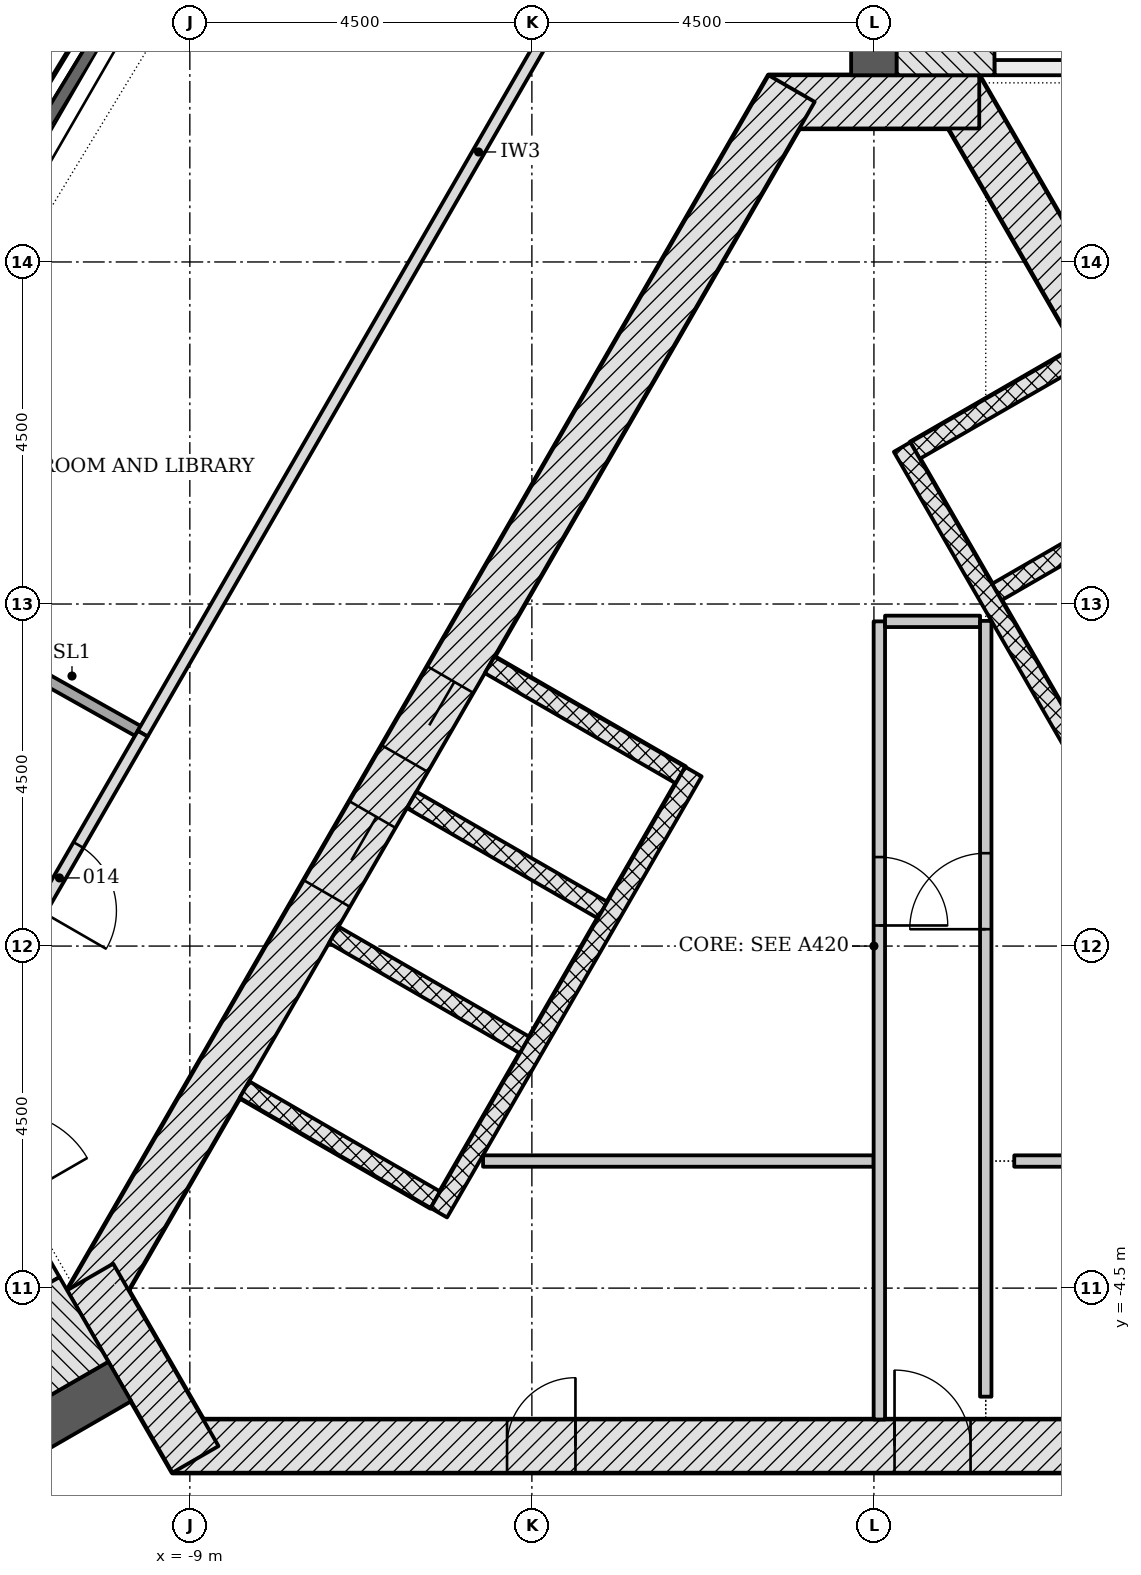
"""IFC4 building model, lengths in metres.
Left out: names, types, materials, properties, quantities, classifications, styles, units other than length and angle.
Written with IfcOpenShell. Run it as: python <this file> out.ifc"""

import sys

from ifc_helpers import new_model, si_unit, direction, frame, frame_2d, origin, place, context, subcontext, project, spatial, rectangle, extrude, element, fill, save


model = new_model("IFC4")
c1 = context("Model", 3, precision=1e-05, world=origin(), true_north=direction((0.0, 1.0)))
c2 = subcontext(c1, "Body", "Model", "MODEL_VIEW")
j1 = project(units=[si_unit("LENGTHUNIT", "METRE"), si_unit("PLANEANGLEUNIT", "RADIAN")], contexts=[c1])
p1 = place(None, origin())
s1 = spatial("IfcSite", under=j1, at=p1, CompositionType="ELEMENT")
p2 = place(p1, origin())
s2 = spatial("IfcBuilding", under=s1, at=p2, CompositionType="ELEMENT")
p3 = place(p2, frame((0.0, 0.0, 240.0)))
s3 = spatial("IfcBuildingStorey", under=s2, at=p3, CompositionType="ELEMENT", Elevation=240.0)
p4 = place(p3, frame((-9.229, -6.578, -0.2), z_axis=(0.0, 0.0, 1.0), x_axis=(1.0, 0.0, 0.0)))
e1 = element("IfcWall", 1, at=p4, inside=s3, PredefinedType="SHEAR", context=c2, shape_type="SweptSolid", body=[
    extrude(rectangle(XDim=18.458, YDim=0.7, at=frame_2d((9.229, 0.0))), origin(), (0.0, 0.0, 1.0), 3.6),
])
p5 = place(p4, frame((9.5, 0.0, 0.2)))
e2 = element("IfcOpeningElement", 2, at=p5, cuts=e1, PredefinedType="OPENING", context=c2, shape_type="SweptSolid", body=[
    extrude(rectangle(XDim=1.0, YDim=2.1, at=frame_2d((0.5, 1.05))), frame((0.0, 0.36, 0.0), z_axis=(0.0, -1.0, 0.0), x_axis=(1.0, 0.0, 0.0)), (0.0, 0.0, 1.0), 0.72),
])
p6 = place(p4, frame((4.402, 0.0, 0.2)))
e3 = element("IfcOpeningElement", 3, at=p6, cuts=e1, PredefinedType="OPENING", context=c2, shape_type="SweptSolid", body=[
    extrude(rectangle(XDim=0.9, YDim=2.1, at=frame_2d((0.45, 1.05))), frame((0.0, 0.36, 0.0), z_axis=(0.0, -1.0, 0.0), x_axis=(1.0, 0.0, 0.0)), (0.0, 0.0, 1.0), 0.72),
])
p7 = place(p4, frame((13.927, 0.0, 0.2)))
e4 = element("IfcOpeningElement", 4, at=p7, cuts=e1, PredefinedType="OPENING", context=c2, shape_type="SweptSolid", body=[
    extrude(rectangle(XDim=0.9, YDim=2.1, at=frame_2d((0.45, 1.05))), frame((0.0, 0.36, 0.0), z_axis=(0.0, -1.0, 0.0), x_axis=(1.0, 0.0, 0.0)), (0.0, 0.0, 1.0), 0.72),
])
p8 = place(p3, frame((10.311, -4.703, -0.2), z_axis=(0.0, 0.0, 1.0), x_axis=(-0.500001446645, 0.866024568562, 0.0)))
e5 = element("IfcWall", 5, at=p8, inside=s3, PredefinedType="SHEAR", context=c2, shape_type="SweptSolid", body=[
    extrude(rectangle(XDim=18.458, YDim=0.7, at=frame_2d((9.229, 0.0))), origin(), (0.0, 0.0, 1.0), 3.6),
])
p9 = place(p8, frame((4.379, 0.0, 0.2)))
e6 = element("IfcOpeningElement", 6, at=p9, cuts=e5, PredefinedType="OPENING", context=c2, shape_type="SweptSolid", body=[
    extrude(rectangle(XDim=1.1, YDim=2.1, at=frame_2d((0.55, 1.05))), frame((0.0, 0.36, 0.0), z_axis=(0.0, -1.0, 0.0), x_axis=(1.0, 0.0, 0.0)), (0.0, 0.0, 1.0), 0.72),
])
p10 = place(p8, frame((6.529, 0.0, 0.2)))
e7 = element("IfcOpeningElement", 7, at=p10, cuts=e5, PredefinedType="OPENING", context=c2, shape_type="SweptSolid", body=[
    extrude(rectangle(XDim=1.1, YDim=2.1, at=frame_2d((0.55, 1.05))), frame((0.0, 0.36, 0.0), z_axis=(0.0, -1.0, 0.0), x_axis=(1.0, 0.0, 0.0)), (0.0, 0.0, 1.0), 0.72),
])
p11 = place(p8, frame((8.679, 0.0, 0.2)))
e8 = element("IfcOpeningElement", 8, at=p11, cuts=e5, PredefinedType="OPENING", context=c2, shape_type="SweptSolid", body=[
    extrude(rectangle(XDim=1.1, YDim=2.1, at=frame_2d((0.55, 1.05))), frame((0.0, 0.36, 0.0), z_axis=(0.0, -1.0, 0.0), x_axis=(1.0, 0.0, 0.0)), (0.0, 0.0, 1.0), 0.72),
])
p12 = place(p8, frame((10.829, 0.0, 0.2)))
e9 = element("IfcOpeningElement", 9, at=p12, cuts=e5, PredefinedType="OPENING", context=c2, shape_type="SweptSolid", body=[
    extrude(rectangle(XDim=1.1, YDim=2.1, at=frame_2d((0.55, 1.05))), frame((0.0, 0.36, 0.0), z_axis=(0.0, -1.0, 0.0), x_axis=(1.0, 0.0, 0.0)), (0.0, 0.0, 1.0), 0.72),
])
p13 = place(p8, frame((12.979, 0.0, 0.2)))
e10 = element("IfcOpeningElement", 10, at=p13, cuts=e5, PredefinedType="OPENING", context=c2, shape_type="SweptSolid", body=[
    extrude(rectangle(XDim=1.1, YDim=2.1, at=frame_2d((0.55, 1.05))), frame((0.0, 0.36, 0.0), z_axis=(0.0, -1.0, 0.0), x_axis=(1.0, 0.0, 0.0)), (0.0, 0.0, 1.0), 0.72),
])
p14 = place(p3, frame((1.386, 11.106, -0.2), z_axis=(0.0, 0.0, 1.0), x_axis=(-1.0, 0.0, 0.0)))
e11 = element("IfcWall", 11, at=p14, inside=s3, PredefinedType="SHEAR", context=c2, shape_type="SweptSolid", body=[
    extrude(rectangle(XDim=2.771, YDim=0.7, at=frame_2d((1.386, 0.0))), origin(), (0.0, 0.0, 1.0), 3.6),
])
p15 = place(p3, frame((-1.083, 11.281, -0.2), z_axis=(0.0, 0.0, 1.0), x_axis=(-0.500001446645, -0.866024568562, 0.0)))
e12 = element("IfcWall", 12, at=p15, inside=s3, PredefinedType="SHEAR", context=c2, shape_type="SweptSolid", body=[
    extrude(rectangle(XDim=18.458, YDim=0.7, at=frame_2d((9.229, 0.0))), origin(), (0.0, 0.0, 1.0), 3.6),
])
p16 = place(p15, frame((8.979, 0.0, 0.2)))
e13 = element("IfcOpeningElement", 13, at=p16, cuts=e12, PredefinedType="OPENING", context=c2, shape_type="SweptSolid", body=[
    extrude(rectangle(XDim=1.2, YDim=2.1, at=frame_2d((0.6, 1.05))), frame((0.0, 0.36, 0.0), z_axis=(0.0, -1.0, 0.0), x_axis=(1.0, 0.0, 0.0)), (0.0, 0.0, 1.0), 0.72),
])
p17 = place(p15, frame((11.029, 0.0, 0.2)))
e14 = element("IfcOpeningElement", 14, at=p17, cuts=e12, PredefinedType="OPENING", context=c2, shape_type="SweptSolid", body=[
    extrude(rectangle(XDim=1.2, YDim=2.1, at=frame_2d((0.6, 1.05))), frame((0.0, 0.36, 0.0), z_axis=(0.0, -1.0, 0.0), x_axis=(1.0, 0.0, 0.0)), (0.0, 0.0, 1.0), 0.72),
])
p18 = place(p3, frame((-10.311, -4.353, -0.2), z_axis=(0.0, 0.0, 1.0), x_axis=(0.500042739161, -0.866000726912, 0.0)))
e15 = element("IfcWall", 15, at=p18, inside=s3, PredefinedType="SHEAR", context=c2, shape_type="SweptSolid", body=[
    extrude(rectangle(XDim=2.771, YDim=0.7, at=frame_2d((1.386, 0.0))), origin(), (0.0, 0.0, 1.0), 3.6),
])
p19 = place(p3, frame((0.0, 11.456, -0.2), z_axis=(0.0, 0.0, 1.0), x_axis=(0.0, 1.0, 0.0)))
e16 = element("IfcWall", 16, at=p19, inside=s3, PredefinedType="SHEAR", context=c2, shape_type="SweptSolid", body=[
    extrude(rectangle(XDim=7.094, YDim=0.6, at=frame_2d((3.547, 0.0))), origin(), (0.0, 0.0, 1.0), 3.6),
])
p20 = place(p3, frame((-9.922, -5.728, -0.2), z_axis=(0.0, 0.0, 1.0), x_axis=(-0.866029688112, -0.499992579254, 0.0)))
e17 = element("IfcWall", 17, at=p20, inside=s3, PredefinedType="SHEAR", context=c2, shape_type="SweptSolid", body=[
    extrude(rectangle(XDim=7.093, YDim=0.6, at=frame_2d((3.547, 0.0))), origin(), (0.0, 0.0, 1.0), 3.6),
])
for number, where, z_axis, x_axis in (
    (18, (3.781, 5.907, -0.2), (0.0, 0.0, 1.0), (-0.866, -0.5, 0.0)),
    (19, (2.706, 7.769, -0.2), (0.0, 0.0, 1.0), (-0.866, -0.5, 0.0)),
):
    element("IfcWall", number, at=place(p3, frame(where, z_axis=z_axis, x_axis=x_axis)), inside=s3, PredefinedType="PARTITIONING", context=c2, shape_type="SweptSolid", body=[
        extrude(rectangle(XDim=2.5, YDim=0.25, at=frame_2d((1.25, 0.0))), origin(), (0.0, 0.0, 1.0), 3.6),
    ])
p21 = place(p3, frame((5.87, -2.961, 0.0), z_axis=(0.0, 0.0, 1.0), x_axis=(-0.50000615651, 0.866021849293, 0.0)))
e20 = element("IfcWall", 20, at=p21, inside=s3, PredefinedType="PARTITIONING", context=c2, shape_type="SweptSolid", body=[
    extrude(rectangle(XDim=11.0, YDim=0.25, at=frame_2d((5.5, 0.0))), origin(), (0.0, 0.0, 1.0), 3.4),
])
for number, where, z_axis, x_axis in (
    (21, (-5.056, 3.699, -0.2), (0.0, 0.0, 1.0), (0.866, -0.5, 0.0)),
    (22, (-6.081, 1.923, -0.2), (0.0, 0.0, 1.0), (0.866, -0.5, 0.0)),
    (23, (-7.106, 0.148, -0.2), (0.0, 0.0, 1.0), (0.866, -0.5, 0.0)),
    (24, (-8.281, -1.887, -0.2), (0.0, 0.0, 1.0), (0.866, -0.5, 0.0)),
):
    element("IfcWall", number, at=place(p3, frame(where, z_axis=z_axis, x_axis=x_axis)), inside=s3, PredefinedType="PARTITIONING", context=c2, shape_type="SweptSolid", body=[
        extrude(rectangle(XDim=2.9, YDim=0.25, at=frame_2d((1.45, 0.0))), origin(), (0.0, 0.0, 1.0), 3.6),
    ])
p22 = place(p3, frame((-2.374, 2.294, 0.0), z_axis=(0.0, 0.0, 1.0), x_axis=(-0.500003174267, -0.866023571113, 0.0)))
e25 = element("IfcWall", 25, at=p22, inside=s3, PredefinedType="PARTITIONING", context=c2, shape_type="SweptSolid", body=[
    extrude(rectangle(XDim=6.7, YDim=0.25, at=frame_2d((3.35, 0.0))), origin(), (0.0, 0.0, 1.0), 3.4),
])
p23 = place(p3, frame((-5.142, -2.828, 0.0), z_axis=(0.0, 0.0, 1.0), x_axis=(1.0, 0.0, 0.0)))
e26 = element("IfcWall", 26, at=p23, inside=s3, PredefinedType="PARTITIONING", context=c2, shape_type="SweptSolid", body=[
    extrude(rectangle(XDim=5.139, YDim=0.15, at=frame_2d((2.569, 0.0))), origin(), (0.0, 0.0, 1.0), 3.4),
])
p24 = place(p3, frame((0.071, 4.272, 0.0), z_axis=(0.0, 0.0, 1.0), x_axis=(0.0, -1.0, 0.0)))
e27 = element("IfcWall", 27, at=p24, inside=s3, PredefinedType="PARTITIONING", context=c2, shape_type="SweptSolid", body=[
    extrude(rectangle(XDim=10.5, YDim=0.15, at=frame_2d((5.25, 0.0))), origin(), (0.0, 0.0, 1.0), 3.4),
])
p25 = place(p24, frame((3.101, 0.0, 0.0)))
e28 = element("IfcOpeningElement", 28, at=p25, cuts=e27, PredefinedType="OPENING", context=c2, shape_type="SweptSolid", body=[
    extrude(rectangle(XDim=0.9, YDim=2.1, at=frame_2d((0.45, 1.05))), frame((0.0, 0.085, 0.0), z_axis=(0.0, -1.0, 0.0), x_axis=(1.0, 0.0, 0.0)), (0.0, 0.0, 1.0), 0.17),
])
p26 = place(p3, frame((0.146, 4.272, 0.0), z_axis=(0.0, 0.0, 1.0), x_axis=(1.0, 0.0, 0.0)))
e29 = element("IfcWall", 29, at=p26, inside=s3, PredefinedType="PARTITIONING", context=c2, shape_type="SweptSolid", body=[
    extrude(rectangle(XDim=1.25, YDim=0.15, at=frame_2d((0.625, 0.0))), origin(), (0.0, 0.0, 1.0), 3.4),
])
p27 = place(p3, frame((1.471, -5.928, 0.0), z_axis=(0.0, 0.0, 1.0), x_axis=(0.0, 1.0, 0.0)))
e30 = element("IfcWall", 30, at=p27, inside=s3, PredefinedType="PARTITIONING", context=c2, shape_type="SweptSolid", body=[
    extrude(rectangle(XDim=10.206, YDim=0.15, at=frame_2d((5.103, 0.0))), origin(), (0.0, 0.0, 1.0), 3.4),
])
p28 = place(p27, frame((6.15, 0.0, 0.0)))
e31 = element("IfcOpeningElement", 31, at=p28, cuts=e30, PredefinedType="OPENING", context=c2, shape_type="SweptSolid", body=[
    extrude(rectangle(XDim=1.0, YDim=2.1, at=frame_2d((0.5, 1.05))), frame((0.0, 0.085, 0.0), z_axis=(0.0, -1.0, 0.0), x_axis=(1.0, 0.0, 0.0)), (0.0, 0.0, 1.0), 0.17),
])
p29 = place(p3, frame((1.846, -2.828, 0.0), z_axis=(0.0, 0.0, 1.0), x_axis=(1.0, 0.0, 0.0)))
e32 = element("IfcWall", 32, at=p29, inside=s3, PredefinedType="PARTITIONING", context=c2, shape_type="SweptSolid", body=[
    extrude(rectangle(XDim=3.758, YDim=0.15, at=frame_2d((1.879, 0.0))), origin(), (0.0, 0.0, 1.0), 3.4),
])
p30 = place(p3, frame((5.135, 11.556, -0.2), z_axis=(0.0, 0.0, 1.0), x_axis=(-1.0, 0.0, 0.0)))
e33 = element("IfcWall", 33, at=p30, inside=s3, PredefinedType="SHEAR", context=c2, shape_type="SweptSolid", body=[
    extrude(rectangle(XDim=3.55, YDim=0.2, at=frame_2d((1.775, 0.0))), origin(), (0.0, 0.0, 1.0), 3.6),
])
p31 = place(p30, frame((1.175, 0.0, 0.2)))
e34 = element("IfcOpeningElement", 34, at=p31, cuts=e33, PredefinedType="OPENING", context=c2, shape_type="SweptSolid", body=[
    extrude(rectangle(XDim=1.2, YDim=2.1, at=frame_2d((0.6, 1.05))), frame((0.0, 0.11, 0.0), z_axis=(0.0, -1.0, 0.0), x_axis=(1.0, 0.0, 0.0)), (0.0, 0.0, 1.0), 0.22),
])
p32 = place(p3, frame((0.943, 11.456, -0.2), z_axis=(0.0, 0.0, 1.0), x_axis=(0.0, 1.0, 0.0)))
e35 = element("IfcWall", 35, at=p32, inside=s3, PredefinedType="SHEAR", context=c2, shape_type="SweptSolid", body=[
    extrude(rectangle(XDim=7.094, YDim=1.286, at=frame_2d((3.547, 0.0))), origin(), (0.0, 0.0, 1.0), 3.6),
])
p33 = place(p3, frame((-12.576, -1.331, -0.2), z_axis=(0.0, 0.0, 1.0), x_axis=(0.499970499736, -0.8660424351, 0.0)))
e36 = element("IfcWall", 36, at=p33, inside=s3, PredefinedType="SHEAR", context=c2, shape_type="SweptSolid", body=[
    extrude(rectangle(XDim=3.55, YDim=0.2, at=frame_2d((1.775, 0.0))), origin(), (0.0, 0.0, 1.0), 3.6),
])
p34 = place(p33, frame((1.175, 0.0, 0.2)))
e37 = element("IfcOpeningElement", 37, at=p34, cuts=e36, PredefinedType="OPENING", context=c2, shape_type="SweptSolid", body=[
    extrude(rectangle(XDim=1.2, YDim=2.1, at=frame_2d((0.6, 1.05))), frame((0.0, 0.11, 0.0), z_axis=(0.0, -1.0, 0.0), x_axis=(1.0, 0.0, 0.0)), (0.0, 0.0, 1.0), 0.22),
])
p35 = place(p3, frame((-10.393, -4.912, -0.2), z_axis=(0.0, 0.0, 1.0), x_axis=(-0.866023389271, -0.500003489223, 0.0)))
e38 = element("IfcWall", 38, at=p35, inside=s3, PredefinedType="SHEAR", context=c2, shape_type="SweptSolid", body=[
    extrude(rectangle(XDim=7.094, YDim=1.286, at=frame_2d((3.547, 0.0))), origin(), (0.0, 0.0, 1.0), 3.6),
])
p36 = place(p3, frame((-0.783, 18.1, 0.0), z_axis=(0.0, 0.0, 1.0), x_axis=(-0.499991500055, -0.866030311174, 0.0)))
e39 = element("IfcWall", 39, at=p36, inside=s3, PredefinedType="PARTITIONING", context=c2, shape_type="SweptSolid", body=[
    extrude(rectangle(XDim=17.674, YDim=0.15, at=frame_2d((8.837, 0.0))), origin(), (0.0, 0.0, 1.0), 2.852),
])
p37 = place(p3, frame((-13.558, 5.008, 0.0), z_axis=(0.0, 0.0, 1.0), x_axis=(0.871701726161, -0.490036835971, 0.0)))
e40 = element("IfcWall", 40, at=p37, inside=s3, PredefinedType="PARTITIONING", context=c2, shape_type="SweptSolid", body=[
    extrude(rectangle(XDim=4.443, YDim=0.15, at=frame_2d((2.221, 0.0))), origin(), (0.0, 0.0, 1.0), 3.4),
])
p38 = place(p37, frame((1.759, 0.0, 0.0)))
e41 = element("IfcOpeningElement", 41, at=p38, cuts=e40, PredefinedType="OPENING", context=c2, shape_type="SweptSolid", body=[
    extrude(rectangle(XDim=1.0, YDim=2.1, at=frame_2d((0.5, 1.05))), frame((0.0, 0.085, 0.0), z_axis=(0.0, -1.0, 0.0), x_axis=(1.0, 0.0, 0.0)), (0.0, 0.0, 1.0), 0.17),
])
p39 = place(p3, frame((-9.62, 2.794, 0.0), z_axis=(0.0, 0.0, 1.0), x_axis=(-0.500021421018, -0.866013036001, 0.0)))
e42 = element("IfcWall", 42, at=p39, inside=s3, PredefinedType="PARTITIONING", context=c2, shape_type="SweptSolid", body=[
    extrude(rectangle(XDim=4.383, YDim=0.15, at=frame_2d((2.191, 0.0))), origin(), (0.0, 0.0, 1.0), 2.852),
])
p40 = place(p39, frame((1.691, 0.0, 0.0)))
e43 = element("IfcOpeningElement", 43, at=p40, cuts=e42, PredefinedType="OPENING", context=c2, shape_type="SweptSolid", body=[
    extrude(rectangle(XDim=1.0, YDim=2.1, at=frame_2d((0.5, 1.05))), frame((0.0, 0.085, 0.0), z_axis=(0.0, -1.0, 0.0), x_axis=(1.0, 0.0, 0.0)), (0.0, 0.0, 1.0), 0.17),
])
p41 = place(p16, origin())
e44 = element("IfcDoor", 44, at=p41, inside=s3, OperationType="DOUBLE_DOOR_SLIDING", PredefinedType="DOOR", context=c2, shape_type="SweptSolid", body=[
    extrude(rectangle(XDim=1.2, YDim=2.1, at=frame_2d((0.6, 1.05))), frame((0.0, 0.025, 0.0), z_axis=(0.0, -1.0, 0.0), x_axis=(1.0, 0.0, 0.0)), (0.0, 0.0, 1.0), 0.05),
])
fill(e13, e44)
p42 = place(p17, origin())
e45 = element("IfcDoor", 45, at=p42, inside=s3, OperationType="DOUBLE_DOOR_SLIDING", PredefinedType="DOOR", context=c2, shape_type="SweptSolid", body=[
    extrude(rectangle(XDim=1.2, YDim=2.1, at=frame_2d((0.6, 1.05))), frame((0.0, 0.025, 0.0), z_axis=(0.0, -1.0, 0.0), x_axis=(1.0, 0.0, 0.0)), (0.0, 0.0, 1.0), 0.05),
])
fill(e14, e45)
p43 = place(p5, origin())
e46 = element("IfcDoor", 46, at=p43, inside=s3, OperationType="SINGLE_SWING_LEFT", PredefinedType="DOOR", context=c2, shape_type="SweptSolid", body=[
    extrude(rectangle(XDim=1.0, YDim=2.1, at=frame_2d((0.5, 1.05))), frame((0.0, 0.075, 0.0), z_axis=(0.0, -1.0, 0.0), x_axis=(1.0, 0.0, 0.0)), (0.0, 0.0, 1.0), 0.15),
])
fill(e2, e46)
p44 = place(p6, origin())
e47 = element("IfcDoor", 47, at=p44, inside=s3, OperationType="SINGLE_SWING_RIGHT", PredefinedType="DOOR", context=c2, shape_type="SweptSolid", body=[
    extrude(rectangle(XDim=0.9, YDim=2.1, at=frame_2d((0.45, 1.05))), frame((0.0, 0.075, 0.0), z_axis=(0.0, -1.0, 0.0), x_axis=(1.0, 0.0, 0.0)), (0.0, 0.0, 1.0), 0.15),
])
fill(e3, e47)
p45 = place(p25, origin())
e48 = element("IfcDoor", 48, at=p45, inside=s3, OperationType="SINGLE_SWING_RIGHT", PredefinedType="DOOR", context=c2, shape_type="SweptSolid", body=[
    extrude(rectangle(XDim=0.9, YDim=2.1, at=frame_2d((0.45, 1.05))), frame((0.0, 0.025, 0.0), z_axis=(0.0, -1.0, 0.0), x_axis=(1.0, 0.0, 0.0)), (0.0, 0.0, 1.0), 0.05),
])
fill(e28, e48)
p46 = place(p28, origin())
e49 = element("IfcDoor", 49, at=p46, inside=s3, OperationType="SINGLE_SWING_LEFT", PredefinedType="DOOR", context=c2, shape_type="SweptSolid", body=[
    extrude(rectangle(XDim=1.0, YDim=2.1, at=frame_2d((0.5, 1.05))), frame((0.0, 0.025, 0.0), z_axis=(0.0, -1.0, 0.0), x_axis=(1.0, 0.0, 0.0)), (0.0, 0.0, 1.0), 0.05),
])
fill(e31, e49)
p47 = place(p40, origin())
e50 = element("IfcDoor", 50, at=p47, inside=s3, OperationType="SINGLE_SWING_RIGHT", PredefinedType="DOOR", context=c2, shape_type="SweptSolid", body=[
    extrude(rectangle(XDim=1.0, YDim=2.1, at=frame_2d((0.5, 1.05))), frame((0.0, 0.025, 0.0), z_axis=(0.0, -1.0, 0.0), x_axis=(1.0, 0.0, 0.0)), (0.0, 0.0, 1.0), 0.05),
])
fill(e43, e50)
save(model, sys.argv[1])
